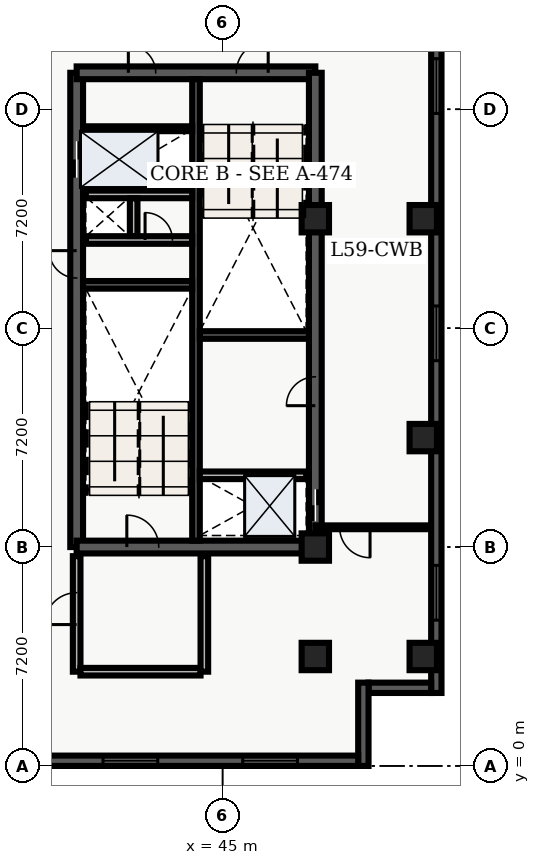
"""IFC4 building model, lengths in metres.
Left out: names, types, materials, properties, quantities, classifications, styles, units other than length and angle.
Written with IfcOpenShell. Run it as: python <this file> out.ifc"""

import sys

from ifc_helpers import new_model, entity, si_unit, converted_unit, direction, frame, origin_with_axes, origin_2d_with_axis, place, context, subcontext, project, spatial, polyline, rectangle, outline, extrude, element, fill, save


model = new_model("IFC4")
c1 = context("Model", 3, precision=1e-05, world=origin_with_axes(), true_north=direction((0.0, 1.0)))
c2 = subcontext(c1, "Body", "Model", "MODEL_VIEW")
j1 = project(units=[si_unit("LENGTHUNIT", "METRE"), converted_unit("PLANEANGLEUNIT", "DEGREE", entity("IfcPlaneAngleMeasure", 0.017), si_unit("PLANEANGLEUNIT", "RADIAN"), dimensions=[0, 0, 0, 0, 0, 0, 0])], contexts=[c1])
p1 = place(None, origin_with_axes())
s1 = spatial("IfcSite", under=j1, at=p1, CompositionType="ELEMENT")
p2 = place(p1, origin_with_axes())
s2 = spatial("IfcBuilding", under=s1, at=p2, CompositionType="ELEMENT")
p3 = place(p2, frame((0.0, 0.0, 240.3), z_axis=(0.0, 0.0, 1.0), x_axis=(1.0, 0.0, 0.0)))
s3 = spatial("IfcBuildingStorey", under=s2, at=p3, CompositionType="ELEMENT", Elevation=240.3)
p4 = place(p3, frame((40.2, 7.2, 0.0), z_axis=(0.0, 0.0, 1.0), x_axis=(0.0, 1.0, 0.0)))
e1 = element("IfcWall", 1, at=p4, inside=s3, PredefinedType="SHEAR", context=c2, shape_type="SweptSolid", body=[
    extrude(outline(polyline([(0.0, -0.21), (15.6, -0.21), (15.6, 0.21), (0.0, 0.21), (0.0, -0.21)])), origin_with_axes(), (0.0, 0.0, 1.0), 3.66),
])
p5 = place(p4, frame((12.75, 0.0, 0.0), z_axis=(0.0, 0.0, 1.0), x_axis=(1.0, 0.0, 0.0)))
e2 = element("IfcOpeningElement", 2, at=p5, cuts=e1, PredefinedType="OPENING", context=c2, shape_type="SweptSolid", body=[
    extrude(rectangle(XDim=1.2, YDim=0.44, at=origin_2d_with_axis()), origin_with_axes(), (0.0, 0.0, 1.0), 2.15),
])
p6 = place(p4, frame((9.3, 0.0, 0.0), z_axis=(0.0, 0.0, 1.0), x_axis=(1.0, 0.0, 0.0)))
e3 = element("IfcOpeningElement", 3, at=p6, cuts=e1, PredefinedType="OPENING", context=c2, shape_type="SweptSolid", body=[
    extrude(rectangle(XDim=0.9, YDim=0.44, at=origin_2d_with_axis()), origin_with_axes(), (0.0, 0.0, 1.0), 2.15),
])
p7 = place(p3, frame((40.2, 7.2, 0.0), z_axis=(0.0, 0.0, 1.0), x_axis=(1.0, 0.0, 0.0)))
e4 = element("IfcWall", 4, at=p7, inside=s3, PredefinedType="SHEAR", context=c2, shape_type="SweptSolid", body=[
    extrude(outline(polyline([(0.0, -0.21), (7.85, -0.21), (7.85, 0.21), (0.0, 0.21), (0.0, -0.21)])), origin_with_axes(), (0.0, 0.0, 1.0), 3.66),
])
p8 = place(p7, frame((2.175, 0.0, 0.0), z_axis=(0.0, 0.0, 1.0), x_axis=(1.0, 0.0, 0.0)))
e5 = element("IfcOpeningElement", 5, at=p8, cuts=e4, PredefinedType="OPENING", context=c2, shape_type="SweptSolid", body=[
    extrude(rectangle(XDim=1.05, YDim=0.44, at=origin_2d_with_axis()), origin_with_axes(), (0.0, 0.0, 1.0), 2.15),
])
p9 = place(p3, frame((40.2, 22.8, 0.0), z_axis=(0.0, 0.0, 1.0), x_axis=(1.0, 0.0, 0.0)))
e6 = element("IfcWall", 6, at=p9, inside=s3, PredefinedType="SHEAR", context=c2, shape_type="SweptSolid", body=[
    extrude(outline(polyline([(0.0, -0.21), (7.85, -0.21), (7.85, 0.21), (0.0, 0.21), (0.0, -0.21)])), origin_with_axes(), (0.0, 0.0, 1.0), 3.66),
])
p10 = place(p9, frame((5.775, 0.0, 0.0), z_axis=(0.0, 0.0, 1.0), x_axis=(1.0, 0.0, 0.0)))
e7 = element("IfcOpeningElement", 7, at=p10, cuts=e6, PredefinedType="OPENING", context=c2, shape_type="SweptSolid", body=[
    extrude(rectangle(XDim=1.05, YDim=0.44, at=origin_2d_with_axis()), origin_with_axes(), (0.0, 0.0, 1.0), 2.15),
])
p11 = place(p9, frame((2.15, 0.0, 0.0), z_axis=(0.0, 0.0, 1.0), x_axis=(1.0, 0.0, 0.0)))
e8 = element("IfcOpeningElement", 8, at=p11, cuts=e6, PredefinedType="OPENING", context=c2, shape_type="SweptSolid", body=[
    extrude(rectangle(XDim=0.9, YDim=0.44, at=origin_2d_with_axis()), origin_with_axes(), (0.0, 0.0, 1.0), 2.15),
])
p12 = place(p3, frame((48.05, 7.2, 0.0), z_axis=(0.0, 0.0, 1.0), x_axis=(0.0, 1.0, 0.0)))
e9 = element("IfcWall", 9, at=p12, inside=s3, PredefinedType="SHEAR", context=c2, shape_type="SweptSolid", body=[
    extrude(outline(polyline([(0.0, -0.21), (15.6, -0.21), (15.6, 0.21), (0.0, 0.21), (0.0, -0.21)])), origin_with_axes(), (0.0, 0.0, 1.0), 3.66),
])
p13 = place(p12, frame((1.375, 0.0, 0.0), z_axis=(0.0, 0.0, 1.0), x_axis=(1.0, 0.0, 0.0)))
e10 = element("IfcOpeningElement", 10, at=p13, cuts=e9, PredefinedType="OPENING", context=c2, shape_type="SweptSolid", body=[
    extrude(rectangle(XDim=1.05, YDim=0.44, at=origin_2d_with_axis()), origin_with_axes(), (0.0, 0.0, 1.0), 2.15),
])
p14 = place(p12, frame((5.125, 0.0, 0.0), z_axis=(0.0, 0.0, 1.0), x_axis=(1.0, 0.0, 0.0)))
e11 = element("IfcOpeningElement", 11, at=p14, cuts=e9, PredefinedType="OPENING", context=c2, shape_type="SweptSolid", body=[
    extrude(rectangle(XDim=0.95, YDim=0.44, at=origin_2d_with_axis()), origin_with_axes(), (0.0, 0.0, 1.0), 2.15),
])
p15 = place(p3, frame((44.125, 7.41, 0.0), z_axis=(0.0, 0.0, 1.0), x_axis=(0.0, 1.0, 0.0)))
e12 = element("IfcWall", 12, at=p15, inside=s3, PredefinedType="SHEAR", context=c2, shape_type="SweptSolid", body=[
    extrude(outline(polyline([(0.0, -0.125), (15.18, -0.125), (15.18, 0.125), (0.0, 0.125), (0.0, -0.125)])), origin_with_axes(), (0.0, 0.0, 1.0), 3.66),
])
for number, where, z_axis, x_axis in (
    (13, (40.41, 15.825, 0.0), (0.0, 0.0, 1.0), (1.0, 0.0, 0.0)),
    (14, (44.25, 14.175, 0.0), (0.0, 0.0, 1.0), (1.0, 0.0, 0.0)),
):
    element("IfcWall", number, at=place(p3, frame(where, z_axis=z_axis, x_axis=x_axis)), inside=s3, PredefinedType="SHEAR", context=c2, shape_type="SweptSolid", body=[
        extrude(outline(polyline([(0.0, -0.125), (3.59, -0.125), (3.59, 0.125), (0.0, 0.125), (0.0, -0.125)])), origin_with_axes(), (0.0, 0.0, 1.0), 3.66),
    ])
p16 = place(p3, frame((40.5, 17.3, 0.0), z_axis=(0.0, 0.0, 1.0), x_axis=(1.0, 0.0, 0.0)))
e15 = element("IfcWall", 15, at=p16, inside=s3, PredefinedType="SOLIDWALL", context=c2, shape_type="SweptSolid", body=[
    extrude(outline(polyline([(0.0, -0.125), (3.5, -0.125), (3.5, 0.125), (0.0, 0.125), (0.0, -0.125)])), origin_with_axes(), (0.0, 0.0, 1.0), 2.7),
])
p17 = place(p16, frame((2.4, 0.0, 0.0), z_axis=(0.0, 0.0, 1.0), x_axis=(1.0, 0.0, 0.0)))
e16 = element("IfcOpeningElement", 16, at=p17, cuts=e15, PredefinedType="OPENING", context=c2, shape_type="SweptSolid", body=[
    extrude(rectangle(XDim=0.9, YDim=0.27, at=origin_2d_with_axis()), origin_with_axes(), (0.0, 0.0, 1.0), 2.15),
])
p18 = place(p3, frame((40.5, 18.8, 0.0), z_axis=(0.0, 0.0, 1.0), x_axis=(1.0, 0.0, 0.0)))
e17 = element("IfcWall", 17, at=p18, inside=s3, PredefinedType="SOLIDWALL", context=c2, shape_type="SweptSolid", body=[
    extrude(outline(polyline([(0.0, -0.125), (3.5, -0.125), (3.5, 0.125), (0.0, 0.125), (0.0, -0.125)])), origin_with_axes(), (0.0, 0.0, 1.0), 2.7),
])
p19 = place(p3, frame((42.075, 17.43, 0.0), z_axis=(0.0, 0.0, 1.0), x_axis=(0.0, 1.0, 0.0)))
e18 = element("IfcWall", 18, at=p19, inside=s3, PredefinedType="SOLIDWALL", context=c2, shape_type="SweptSolid", body=[
    extrude(outline(polyline([(0.0, -0.125), (1.24, -0.125), (1.24, 0.125), (0.0, 0.125), (0.0, -0.125)])), origin_with_axes(), (0.0, 0.0, 1.0), 2.7),
])
p20 = place(p3, frame((40.2, 3.1, 0.0), z_axis=(0.0, 0.0, 1.0), x_axis=(0.0, 1.0, 0.0)))
e19 = element("IfcWall", 19, at=p20, inside=s3, PredefinedType="SOLIDWALL", context=c2, shape_type="SweptSolid", body=[
    extrude(outline(polyline([(0.0, -0.125), (3.8, -0.125), (3.8, 0.125), (0.0, 0.125), (0.0, -0.125)])), origin_with_axes(), (0.0, 0.0, 1.0), 2.7),
])
p21 = place(p20, frame((2.075, 0.0, 0.0), z_axis=(0.0, 0.0, 1.0), x_axis=(1.0, 0.0, 0.0)))
e20 = element("IfcOpeningElement", 20, at=p21, cuts=e19, PredefinedType="OPENING", context=c2, shape_type="SweptSolid", body=[
    extrude(rectangle(XDim=1.05, YDim=0.27, at=origin_2d_with_axis()), origin_with_axes(), (0.0, 0.0, 1.0), 2.15),
])
p22 = place(p3, frame((40.325, 3.1, 0.0), z_axis=(0.0, 0.0, 1.0), x_axis=(1.0, 0.0, 0.0)))
e21 = element("IfcWall", 21, at=p22, inside=s3, PredefinedType="SOLIDWALL", context=c2, shape_type="SweptSolid", body=[
    extrude(outline(polyline([(0.0, -0.125), (3.95, -0.125), (3.95, 0.125), (0.0, 0.125), (0.0, -0.125)])), origin_with_axes(), (0.0, 0.0, 1.0), 2.7),
])
p23 = place(p3, frame((44.4, 3.1, 0.0), z_axis=(0.0, 0.0, 1.0), x_axis=(0.0, 1.0, 0.0)))
e22 = element("IfcWall", 22, at=p23, inside=s3, PredefinedType="SOLIDWALL", context=c2, shape_type="SweptSolid", body=[
    extrude(outline(polyline([(0.0, -0.125), (3.8, -0.125), (3.8, 0.125), (0.0, 0.125), (0.0, -0.125)])), origin_with_axes(), (0.0, 0.0, 1.0), 2.7),
])
for number, where, z_axis, x_axis in (
    (23, (48.05, 3.6, 0.0), (0.0, 0.0, 1.0), (1.0, 0.0, 0.0)),
    (24, (48.05, 7.2, 0.0), (0.0, 0.0, 1.0), (1.0, 0.0, 0.0)),
    (25, (48.05, 18.0, 0.0), (0.0, 0.0, 1.0), (1.0, 0.0, 0.0)),
    (26, (51.6, 3.6, 0.0), (0.0, 0.0, 1.0), (1.0, 0.0, 0.0)),
    (27, (51.6, 10.8, 0.0), (0.0, 0.0, 1.0), (1.0, 0.0, 0.0)),
    (28, (51.6, 18.0, 0.0), (0.0, 0.0, 1.0), (1.0, 0.0, 0.0)),
):
    element("IfcColumn", number, at=place(p3, frame(where, z_axis=z_axis, x_axis=x_axis)), inside=s3, PredefinedType="COLUMN", context=c2, shape_type="SweptSolid", body=[
        extrude(rectangle(XDim=0.9, YDim=0.9, at=origin_2d_with_axis()), origin_with_axes(), (0.0, 0.0, 1.0), 3.9),
    ])
p24 = place(p3, frame((40.5, 20.96, 0.0), z_axis=(0.0, 0.0, 1.0), x_axis=(1.0, 0.0, 0.0)))
e29 = element("IfcWall", 29, at=p24, inside=s3, PredefinedType="PARTITIONING", context=c2, shape_type="SweptSolid", body=[
    extrude(outline(polyline([(0.0, -0.08), (3.5, -0.08), (3.5, 0.08), (0.0, 0.08), (0.0, -0.08)])), origin_with_axes(), (0.0, 0.0, 1.0), 2.7),
])
p25 = place(p3, frame((44.25, 9.56, 0.0), z_axis=(0.0, 0.0, 1.0), x_axis=(1.0, 0.0, 0.0)))
e30 = element("IfcWall", 30, at=p25, inside=s3, PredefinedType="SOLIDWALL", context=c2, shape_type="SweptSolid", body=[
    extrude(outline(polyline([(0.0, -0.125), (3.5, -0.125), (3.5, 0.125), (0.0, 0.125), (0.0, -0.125)])), origin_with_axes(), (0.0, 0.0, 1.0), 2.7),
])
p26 = place(p3, frame((51.865, 7.85, 0.0), z_axis=(0.0, 0.0, 1.0), x_axis=(-1.0, 0.0, 0.0)))
e31 = element("IfcWall", 31, at=p26, inside=s3, PredefinedType="PARTITIONING", context=c2, shape_type="SweptSolid", body=[
    extrude(outline(polyline([(0.0, -0.062), (3.815, -0.062), (3.815, 0.062), (0.0, 0.062), (0.0, -0.062)])), origin_with_axes(), (0.0, 0.0, 1.0), 2.7),
])
p27 = place(p26, frame((2.515, 0.0, 0.0), z_axis=(0.0, 0.0, 1.0), x_axis=(1.0, 0.0, 0.0)))
e32 = element("IfcOpeningElement", 32, at=p27, cuts=e31, PredefinedType="OPENING", context=c2, shape_type="SweptSolid", body=[
    extrude(rectangle(XDim=1.0, YDim=0.145, at=origin_2d_with_axis()), origin_with_axes(), (0.0, 0.0, 1.0), 2.15),
])
p28 = place(p3, frame((52.03, 26.06, 0.0), z_axis=(0.0, 0.0, 1.0), x_axis=(0.0, -1.0, 0.0)))
e33 = element("IfcWall", 33, at=p28, inside=s3, PredefinedType="SOLIDWALL", context=c2, shape_type="SweptSolid", body=[
    extrude(outline(polyline([(0.0, -0.17), (23.66, -0.17), (23.66, 0.17), (0.0, 0.17), (0.0, -0.17)])), origin_with_axes(), (0.0, 0.0, 1.0), 3.66),
])
p29 = place(p28, frame((3.696, 0.0, 0.45), z_axis=(0.0, 0.0, 1.0), x_axis=(1.0, 0.0, 0.0)))
e34 = element("IfcOpeningElement", 34, at=p29, cuts=e33, PredefinedType="OPENING", context=c2, shape_type="SweptSolid", body=[
    extrude(rectangle(XDim=1.8, YDim=0.36, at=origin_2d_with_axis()), origin_with_axes(), (0.0, 0.0, 1.0), 2.1),
])
p30 = place(p28, frame((11.83, 0.0, 0.45), z_axis=(0.0, 0.0, 1.0), x_axis=(1.0, 0.0, 0.0)))
e35 = element("IfcOpeningElement", 35, at=p30, cuts=e33, PredefinedType="OPENING", context=c2, shape_type="SweptSolid", body=[
    extrude(rectangle(XDim=1.8, YDim=0.36, at=origin_2d_with_axis()), origin_with_axes(), (0.0, 0.0, 1.0), 2.1),
])
p31 = place(p28, frame((20.364, 0.0, 0.45), z_axis=(0.0, 0.0, 1.0), x_axis=(1.0, 0.0, 0.0)))
e36 = element("IfcOpeningElement", 36, at=p31, cuts=e33, PredefinedType="OPENING", context=c2, shape_type="SweptSolid", body=[
    extrude(rectangle(XDim=1.8, YDim=0.36, at=origin_2d_with_axis()), origin_with_axes(), (0.0, 0.0, 1.0), 2.1),
])
p32 = place(p3, frame((51.86, 2.57, 0.0), z_axis=(0.0, 0.0, 1.0), x_axis=(-1.0, 0.0, 0.0)))
e37 = element("IfcWall", 37, at=p32, inside=s3, PredefinedType="SOLIDWALL", context=c2, shape_type="SweptSolid", body=[
    extrude(outline(polyline([(0.0, -0.17), (2.06, -0.17), (2.06, 0.17), (0.0, 0.17), (0.0, -0.17)])), origin_with_axes(), (0.0, 0.0, 1.0), 3.66),
])
p33 = place(p3, frame((49.63, 2.74, 0.0), z_axis=(0.0, 0.0, 1.0), x_axis=(0.0, -1.0, 0.0)))
e38 = element("IfcWall", 38, at=p33, inside=s3, PredefinedType="SOLIDWALL", context=c2, shape_type="SweptSolid", body=[
    extrude(outline(polyline([(0.0, -0.17), (2.74, -0.17), (2.74, 0.17), (0.0, 0.17), (0.0, -0.17)])), origin_with_axes(), (0.0, 0.0, 1.0), 3.66),
])
p34 = place(p3, frame((49.46, 0.17, 0.0), z_axis=(0.0, 0.0, 1.0), x_axis=(-1.0, 0.0, 0.0)))
e39 = element("IfcWall", 39, at=p34, inside=s3, PredefinedType="SOLIDWALL", context=c2, shape_type="SweptSolid", body=[
    extrude(outline(polyline([(0.0, -0.17), (42.56, -0.17), (42.56, 0.17), (0.0, 0.17), (0.0, -0.17)])), origin_with_axes(), (0.0, 0.0, 1.0), 3.66),
])
p35 = place(p34, frame((2.898, 0.0, 0.45), z_axis=(0.0, 0.0, 1.0), x_axis=(1.0, 0.0, 0.0)))
e40 = element("IfcOpeningElement", 40, at=p35, cuts=e39, PredefinedType="OPENING", context=c2, shape_type="SweptSolid", body=[
    extrude(rectangle(XDim=1.8, YDim=0.36, at=origin_2d_with_axis()), origin_with_axes(), (0.0, 0.0, 1.0), 2.1),
])
p36 = place(p34, frame((7.493, 0.0, 0.45), z_axis=(0.0, 0.0, 1.0), x_axis=(1.0, 0.0, 0.0)))
e41 = element("IfcOpeningElement", 41, at=p36, cuts=e39, PredefinedType="OPENING", context=c2, shape_type="SweptSolid", body=[
    extrude(rectangle(XDim=1.8, YDim=0.36, at=origin_2d_with_axis()), origin_with_axes(), (0.0, 0.0, 1.0), 2.1),
])
p37 = place(p34, frame((12.089, 0.0, 0.45), z_axis=(0.0, 0.0, 1.0), x_axis=(1.0, 0.0, 0.0)))
e42 = element("IfcOpeningElement", 42, at=p37, cuts=e39, PredefinedType="OPENING", context=c2, shape_type="SweptSolid", body=[
    extrude(rectangle(XDim=1.8, YDim=0.36, at=origin_2d_with_axis()), origin_with_axes(), (0.0, 0.0, 1.0), 2.1),
])
p38 = place(p34, frame((16.684, 0.0, 0.45), z_axis=(0.0, 0.0, 1.0), x_axis=(1.0, 0.0, 0.0)))
e43 = element("IfcOpeningElement", 43, at=p38, cuts=e39, PredefinedType="OPENING", context=c2, shape_type="SweptSolid", body=[
    extrude(rectangle(XDim=1.8, YDim=0.36, at=origin_2d_with_axis()), origin_with_axes(), (0.0, 0.0, 1.0), 2.1),
])
p39 = place(p34, frame((21.28, 0.0, 0.45), z_axis=(0.0, 0.0, 1.0), x_axis=(1.0, 0.0, 0.0)))
e44 = element("IfcOpeningElement", 44, at=p39, cuts=e39, PredefinedType="OPENING", context=c2, shape_type="SweptSolid", body=[
    extrude(rectangle(XDim=1.8, YDim=0.36, at=origin_2d_with_axis()), origin_with_axes(), (0.0, 0.0, 1.0), 2.1),
])
p40 = place(p34, frame((25.876, 0.0, 0.45), z_axis=(0.0, 0.0, 1.0), x_axis=(1.0, 0.0, 0.0)))
e45 = element("IfcOpeningElement", 45, at=p40, cuts=e39, PredefinedType="OPENING", context=c2, shape_type="SweptSolid", body=[
    extrude(rectangle(XDim=1.8, YDim=0.36, at=origin_2d_with_axis()), origin_with_axes(), (0.0, 0.0, 1.0), 2.1),
])
p41 = place(p34, frame((30.471, 0.0, 0.45), z_axis=(0.0, 0.0, 1.0), x_axis=(1.0, 0.0, 0.0)))
e46 = element("IfcOpeningElement", 46, at=p41, cuts=e39, PredefinedType="OPENING", context=c2, shape_type="SweptSolid", body=[
    extrude(rectangle(XDim=1.8, YDim=0.36, at=origin_2d_with_axis()), origin_with_axes(), (0.0, 0.0, 1.0), 2.1),
])
p42 = place(p34, frame((35.067, 0.0, 0.45), z_axis=(0.0, 0.0, 1.0), x_axis=(1.0, 0.0, 0.0)))
e47 = element("IfcOpeningElement", 47, at=p42, cuts=e39, PredefinedType="OPENING", context=c2, shape_type="SweptSolid", body=[
    extrude(rectangle(XDim=1.8, YDim=0.36, at=origin_2d_with_axis()), origin_with_axes(), (0.0, 0.0, 1.0), 2.1),
])
p43 = place(p34, frame((39.662, 0.0, 0.45), z_axis=(0.0, 0.0, 1.0), x_axis=(1.0, 0.0, 0.0)))
e48 = element("IfcOpeningElement", 48, at=p43, cuts=e39, PredefinedType="OPENING", context=c2, shape_type="SweptSolid", body=[
    extrude(rectangle(XDim=1.8, YDim=0.36, at=origin_2d_with_axis()), origin_with_axes(), (0.0, 0.0, 1.0), 2.1),
])
p44 = place(p12, frame((1.375, 0.0, 0.0), z_axis=(0.0, 0.0, 1.0), x_axis=(1.0, 0.0, 0.0)))
e49 = element("IfcDoor", 49, at=p44, inside=s3, OperationType="SLIDING_TO_LEFT", PredefinedType="DOOR", context=c2, shape_type="SweptSolid", body=[
    extrude(rectangle(XDim=1.05, YDim=0.09, at=origin_2d_with_axis()), origin_with_axes(), (0.0, 0.0, 1.0), 2.15),
])
fill(e10, e49)
p45 = place(p4, frame((12.75, 0.0, 0.0), z_axis=(0.0, 0.0, 1.0), x_axis=(1.0, 0.0, 0.0)))
e50 = element("IfcDoor", 50, at=p45, inside=s3, OperationType="DOUBLE_DOOR_SLIDING", PredefinedType="DOOR", context=c2, shape_type="SweptSolid", body=[
    extrude(rectangle(XDim=1.2, YDim=0.09, at=origin_2d_with_axis()), origin_with_axes(), (0.0, 0.0, 1.0), 2.15),
])
fill(e2, e50)
p46 = place(p4, frame((9.3, 0.0, 0.0), z_axis=(0.0, 0.0, 1.0), x_axis=(1.0, 0.0, 0.0)))
e51 = element("IfcDoor", 51, at=p46, inside=s3, OperationType="SINGLE_SWING_RIGHT", PredefinedType="DOOR", context=c2, shape_type="SweptSolid", body=[
    extrude(rectangle(XDim=0.9, YDim=0.09, at=origin_2d_with_axis()), origin_with_axes(), (0.0, 0.0, 1.0), 2.15),
])
fill(e3, e51)
p47 = place(p16, frame((2.4, 0.0, 0.0), z_axis=(0.0, 0.0, 1.0), x_axis=(1.0, 0.0, 0.0)))
e52 = element("IfcDoor", 52, at=p47, inside=s3, OperationType="SINGLE_SWING_LEFT", PredefinedType="DOOR", context=c2, shape_type="SweptSolid", body=[
    extrude(rectangle(XDim=0.9, YDim=0.09, at=origin_2d_with_axis()), origin_with_axes(), (0.0, 0.0, 1.0), 2.15),
])
fill(e16, e52)
p48 = place(p7, frame((2.175, 0.0, 0.0), z_axis=(0.0, 0.0, 1.0), x_axis=(1.0, 0.0, 0.0)))
e53 = element("IfcDoor", 53, at=p48, inside=s3, OperationType="SINGLE_SWING_LEFT", PredefinedType="DOOR", context=c2, shape_type="SweptSolid", body=[
    extrude(rectangle(XDim=1.05, YDim=0.09, at=origin_2d_with_axis()), origin_with_axes(), (0.0, 0.0, 1.0), 2.15),
])
fill(e5, e53)
p49 = place(p9, frame((5.775, 0.0, 0.0), z_axis=(0.0, 0.0, 1.0), x_axis=(1.0, 0.0, 0.0)))
e54 = element("IfcDoor", 54, at=p49, inside=s3, OperationType="SINGLE_SWING_RIGHT", PredefinedType="DOOR", context=c2, shape_type="SweptSolid", body=[
    extrude(rectangle(XDim=1.05, YDim=0.09, at=origin_2d_with_axis()), origin_with_axes(), (0.0, 0.0, 1.0), 2.15),
])
fill(e7, e54)
p50 = place(p20, frame((2.075, 0.0, 0.0), z_axis=(0.0, 0.0, 1.0), x_axis=(1.0, 0.0, 0.0)))
e55 = element("IfcDoor", 55, at=p50, inside=s3, OperationType="SINGLE_SWING_LEFT", PredefinedType="DOOR", context=c2, shape_type="SweptSolid", body=[
    extrude(rectangle(XDim=1.05, YDim=0.09, at=origin_2d_with_axis()), origin_with_axes(), (0.0, 0.0, 1.0), 2.15),
])
fill(e20, e55)
p51 = place(p9, frame((2.15, 0.0, 0.0), z_axis=(0.0, 0.0, 1.0), x_axis=(1.0, 0.0, 0.0)))
e56 = element("IfcDoor", 56, at=p51, inside=s3, OperationType="SINGLE_SWING_LEFT", PredefinedType="DOOR", context=c2, shape_type="SweptSolid", body=[
    extrude(rectangle(XDim=0.9, YDim=0.09, at=origin_2d_with_axis()), origin_with_axes(), (0.0, 0.0, 1.0), 2.15),
])
fill(e8, e56)
p52 = place(p12, frame((5.125, 0.0, 0.0), z_axis=(0.0, 0.0, 1.0), x_axis=(1.0, 0.0, 0.0)))
e57 = element("IfcDoor", 57, at=p52, inside=s3, OperationType="SINGLE_SWING_LEFT", PredefinedType="DOOR", context=c2, shape_type="SweptSolid", body=[
    extrude(rectangle(XDim=0.95, YDim=0.09, at=origin_2d_with_axis()), origin_with_axes(), (0.0, 0.0, 1.0), 2.15),
])
fill(e11, e57)
p53 = place(p26, frame((2.515, 0.0, 0.0), z_axis=(0.0, 0.0, 1.0), x_axis=(1.0, 0.0, 0.0)))
e58 = element("IfcDoor", 58, at=p53, inside=s3, OperationType="SINGLE_SWING_LEFT", PredefinedType="DOOR", context=c2, shape_type="SweptSolid", body=[
    extrude(rectangle(XDim=1.0, YDim=0.075, at=origin_2d_with_axis()), origin_with_axes(), (0.0, 0.0, 1.0), 2.15),
])
fill(e32, e58)
p54 = place(p28, frame((3.696, 0.0, 0.45), z_axis=(0.0, 0.0, 1.0), x_axis=(1.0, 0.0, 0.0)))
e59 = element("IfcWindow", 59, at=p54, inside=s3, PredefinedType="WINDOW", context=c2, shape_type="SweptSolid", body=[
    extrude(rectangle(XDim=1.8, YDim=0.09, at=origin_2d_with_axis()), origin_with_axes(), (0.0, 0.0, 1.0), 2.1),
])
fill(e34, e59)
p55 = place(p28, frame((11.83, 0.0, 0.45), z_axis=(0.0, 0.0, 1.0), x_axis=(1.0, 0.0, 0.0)))
e60 = element("IfcWindow", 60, at=p55, inside=s3, PredefinedType="WINDOW", context=c2, shape_type="SweptSolid", body=[
    extrude(rectangle(XDim=1.8, YDim=0.09, at=origin_2d_with_axis()), origin_with_axes(), (0.0, 0.0, 1.0), 2.1),
])
fill(e35, e60)
p56 = place(p28, frame((20.364, 0.0, 0.45), z_axis=(0.0, 0.0, 1.0), x_axis=(1.0, 0.0, 0.0)))
e61 = element("IfcWindow", 61, at=p56, inside=s3, PredefinedType="WINDOW", context=c2, shape_type="SweptSolid", body=[
    extrude(rectangle(XDim=1.8, YDim=0.09, at=origin_2d_with_axis()), origin_with_axes(), (0.0, 0.0, 1.0), 2.1),
])
fill(e36, e61)
p57 = place(p34, frame((2.898, 0.0, 0.45), z_axis=(0.0, 0.0, 1.0), x_axis=(1.0, 0.0, 0.0)))
e62 = element("IfcWindow", 62, at=p57, inside=s3, PredefinedType="WINDOW", context=c2, shape_type="SweptSolid", body=[
    extrude(rectangle(XDim=1.8, YDim=0.09, at=origin_2d_with_axis()), origin_with_axes(), (0.0, 0.0, 1.0), 2.1),
])
fill(e40, e62)
p58 = place(p34, frame((7.493, 0.0, 0.45), z_axis=(0.0, 0.0, 1.0), x_axis=(1.0, 0.0, 0.0)))
e63 = element("IfcWindow", 63, at=p58, inside=s3, PredefinedType="WINDOW", context=c2, shape_type="SweptSolid", body=[
    extrude(rectangle(XDim=1.8, YDim=0.09, at=origin_2d_with_axis()), origin_with_axes(), (0.0, 0.0, 1.0), 2.1),
])
fill(e41, e63)
save(model, sys.argv[1])
